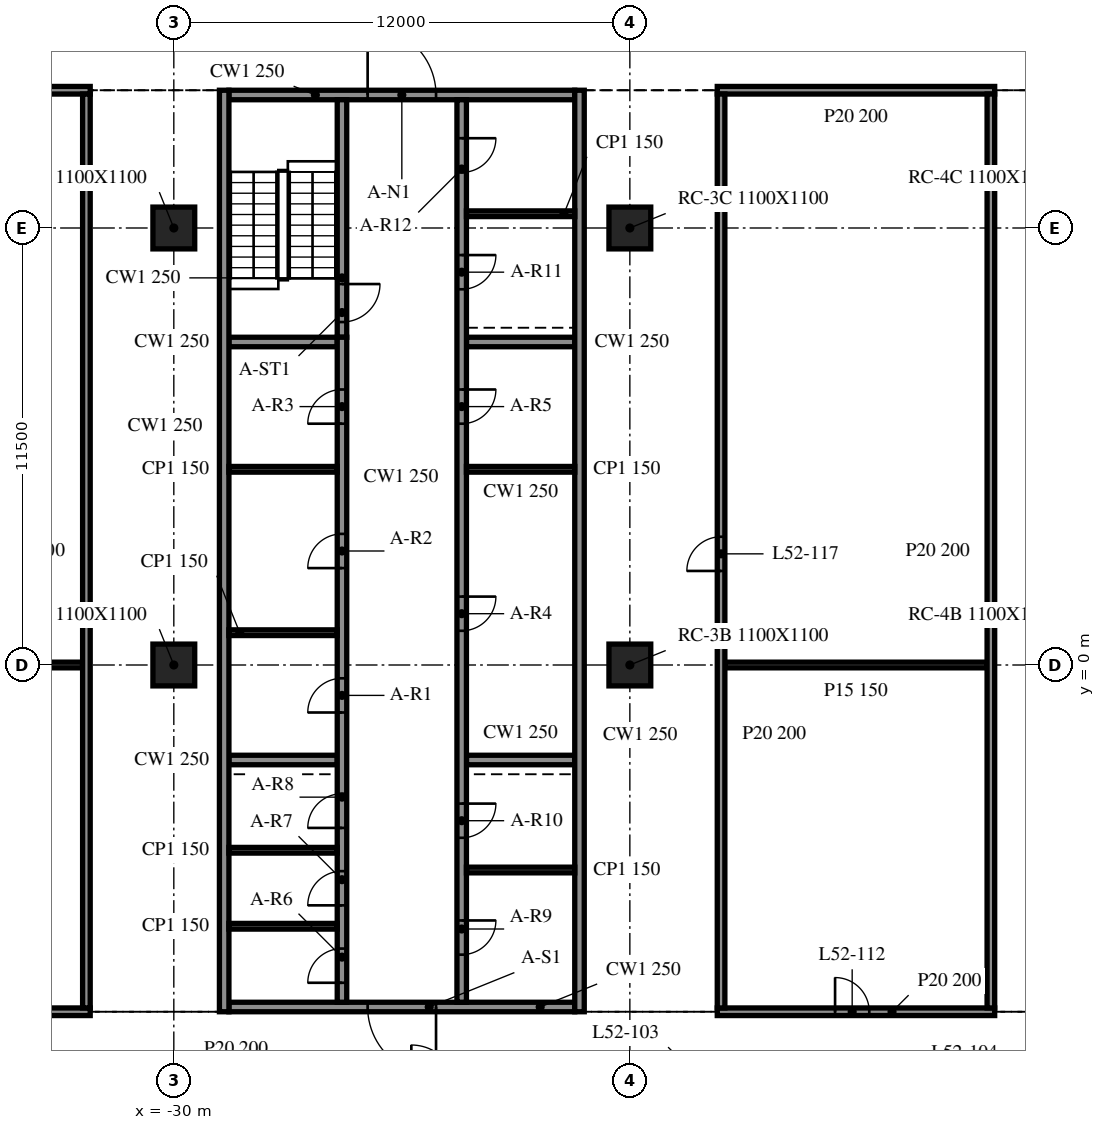
"""IFC4 building model, lengths in metres.
Left out: names, types, materials, properties, quantities, classifications, styles, units other than length and angle.
Written with IfcOpenShell. Run it as: python <this file> out.ifc"""

import sys

from ifc_helpers import new_model, si_unit, direction, frame, frame_2d, origin, origin_2d, place, context, subcontext, project, spatial, rectangle, extrude, element, fill, save


model = new_model("IFC4")
c1 = context("Model", 3, precision=1e-05, world=origin(), true_north=direction((0.0, 1.0)))
c2 = subcontext(c1, "Body", "Model", "MODEL_VIEW")
j1 = project(units=[si_unit("LENGTHUNIT", "METRE"), si_unit("PLANEANGLEUNIT", "RADIAN")], contexts=[c1])
p1 = place(None, origin())
s1 = spatial("IfcSite", under=j1, at=p1, CompositionType="ELEMENT")
p2 = place(p1, origin())
s2 = spatial("IfcBuilding", under=s1, at=p2, CompositionType="ELEMENT")
p3 = place(p2, frame((0.0, 0.0, 216.7)))
s3 = spatial("IfcBuildingStorey", under=s2, at=p3, CompositionType="ELEMENT", Elevation=216.7)
for number, where, z_axis, x_axis in (
    (1, (-30.0, 0.0, -0.34), (0.0, 0.0, 1.0), (1.0, 0.0, 0.0)),
    (2, (-30.0, 11.5, -0.34), (0.0, 0.0, 1.0), (1.0, 0.0, 0.0)),
    (3, (-18.0, 0.0, -0.34), (0.0, 0.0, 1.0), (1.0, 0.0, 0.0)),
    (4, (-18.0, 11.5, -0.34), (0.0, 0.0, 1.0), (1.0, 0.0, 0.0)),
):
    element("IfcColumn", number, at=place(p3, frame(where, z_axis=z_axis, x_axis=x_axis)), inside=s3, PredefinedType="COLUMN", context=c2, shape_type="SweptSolid", body=[
        extrude(rectangle(XDim=1.1, YDim=1.1, at=origin_2d()), origin(), (0.0, 0.0, 1.0), 3.8),
    ])
for number, where, z_axis, x_axis in (
    (5, (-28.675, 15.125, 0.0), (0.0, 0.0, 1.0), (0.0, -1.0, 0.0)),
    (6, (-19.325, -9.125, 0.0), (0.0, 0.0, 1.0), (0.0, 1.0, 0.0)),
):
    element("IfcWall", number, at=place(p3, frame(where, z_axis=z_axis, x_axis=x_axis)), inside=s3, PredefinedType="SOLIDWALL", context=c2, shape_type="SweptSolid", body=[
        extrude(rectangle(XDim=24.25, YDim=0.25, at=frame_2d((12.125, 0.0))), origin(), (0.0, 0.0, 1.0), 3.46),
    ])
p4 = place(p3, frame((-19.45, -9.0, 0.0), z_axis=(0.0, 0.0, 1.0), x_axis=(-1.0, 0.0, 0.0)))
e7 = element("IfcWall", 7, at=p4, inside=s3, PredefinedType="SOLIDWALL", context=c2, shape_type="SweptSolid", body=[
    extrude(rectangle(XDim=9.1, YDim=0.25, at=frame_2d((4.55, 0.0))), origin(), (0.0, 0.0, 1.0), 3.46),
])
p5 = place(p4, frame((3.65, 0.0, 0.0)))
e8 = element("IfcOpeningElement", 8, at=p5, cuts=e7, PredefinedType="OPENING", context=c2, shape_type="SweptSolid", body=[
    extrude(rectangle(XDim=1.8, YDim=2.1, at=frame_2d((0.9, 1.05))), frame((0.0, 0.135, 0.0), z_axis=(0.0, -1.0, 0.0), x_axis=(1.0, 0.0, 0.0)), (0.0, 0.0, 1.0), 0.27),
])
p6 = place(p3, frame((-28.55, 15.0, 0.0), z_axis=(0.0, 0.0, 1.0), x_axis=(1.0, 0.0, 0.0)))
e9 = element("IfcWall", 9, at=p6, inside=s3, PredefinedType="SOLIDWALL", context=c2, shape_type="SweptSolid", body=[
    extrude(rectangle(XDim=9.1, YDim=0.25, at=frame_2d((4.55, 0.0))), origin(), (0.0, 0.0, 1.0), 3.46),
])
p7 = place(p6, frame((3.65, 0.0, 0.0)))
e10 = element("IfcOpeningElement", 10, at=p7, cuts=e9, PredefinedType="OPENING", context=c2, shape_type="SweptSolid", body=[
    extrude(rectangle(XDim=1.8, YDim=2.1, at=frame_2d((0.9, 1.05))), frame((0.0, 0.135, 0.0), z_axis=(0.0, -1.0, 0.0), x_axis=(1.0, 0.0, 0.0)), (0.0, 0.0, 1.0), 0.27),
])
p8 = place(p3, frame((-25.575, -8.875, 0.0), z_axis=(0.0, 0.0, 1.0), x_axis=(0.0, 1.0, 0.0)))
e11 = element("IfcWall", 11, at=p8, inside=s3, PredefinedType="SOLIDWALL", context=c2, shape_type="SweptSolid", body=[
    extrude(rectangle(XDim=17.5, YDim=0.25, at=frame_2d((8.75, 0.0))), origin(), (0.0, 0.0, 1.0), 3.46),
])
p9 = place(p8, frame((7.625, 0.0, 0.0)))
e12 = element("IfcOpeningElement", 12, at=p9, cuts=e11, PredefinedType="OPENING", context=c2, shape_type="SweptSolid", body=[
    extrude(rectangle(XDim=0.9, YDim=2.1, at=frame_2d((0.45, 1.05))), frame((0.0, 0.135, 0.0), z_axis=(0.0, -1.0, 0.0), x_axis=(1.0, 0.0, 0.0)), (0.0, 0.0, 1.0), 0.27),
])
p10 = place(p8, frame((11.425, 0.0, 0.0)))
e13 = element("IfcOpeningElement", 13, at=p10, cuts=e11, PredefinedType="OPENING", context=c2, shape_type="SweptSolid", body=[
    extrude(rectangle(XDim=0.9, YDim=2.1, at=frame_2d((0.45, 1.05))), frame((0.0, 0.135, 0.0), z_axis=(0.0, -1.0, 0.0), x_axis=(1.0, 0.0, 0.0)), (0.0, 0.0, 1.0), 0.27),
])
p11 = place(p8, frame((15.225, 0.0, 0.0)))
e14 = element("IfcOpeningElement", 14, at=p11, cuts=e11, PredefinedType="OPENING", context=c2, shape_type="SweptSolid", body=[
    extrude(rectangle(XDim=0.9, YDim=2.1, at=frame_2d((0.45, 1.05))), frame((0.0, 0.135, 0.0), z_axis=(0.0, -1.0, 0.0), x_axis=(1.0, 0.0, 0.0)), (0.0, 0.0, 1.0), 0.27),
])
p12 = place(p8, frame((0.512, 0.0, 0.0)))
e15 = element("IfcOpeningElement", 15, at=p12, cuts=e11, PredefinedType="OPENING", context=c2, shape_type="SweptSolid", body=[
    extrude(rectangle(XDim=0.9, YDim=2.1, at=frame_2d((0.45, 1.05))), frame((0.0, 0.135, 0.0), z_axis=(0.0, -1.0, 0.0), x_axis=(1.0, 0.0, 0.0)), (0.0, 0.0, 1.0), 0.27),
])
p13 = place(p8, frame((2.55, 0.0, 0.0)))
e16 = element("IfcOpeningElement", 16, at=p13, cuts=e11, PredefinedType="OPENING", context=c2, shape_type="SweptSolid", body=[
    extrude(rectangle(XDim=0.9, YDim=2.1, at=frame_2d((0.45, 1.05))), frame((0.0, 0.135, 0.0), z_axis=(0.0, -1.0, 0.0), x_axis=(1.0, 0.0, 0.0)), (0.0, 0.0, 1.0), 0.27),
])
p14 = place(p8, frame((4.587, 0.0, 0.0)))
e17 = element("IfcOpeningElement", 17, at=p14, cuts=e11, PredefinedType="OPENING", context=c2, shape_type="SweptSolid", body=[
    extrude(rectangle(XDim=0.9, YDim=2.1, at=frame_2d((0.45, 1.05))), frame((0.0, 0.135, 0.0), z_axis=(0.0, -1.0, 0.0), x_axis=(1.0, 0.0, 0.0)), (0.0, 0.0, 1.0), 0.27),
])
p15 = place(p3, frame((-25.575, 14.875, 0.0), z_axis=(0.0, 0.0, 1.0), x_axis=(0.0, -1.0, 0.0)))
e18 = element("IfcWall", 18, at=p15, inside=s3, PredefinedType="SOLIDWALL", context=c2, shape_type="SweptSolid", body=[
    extrude(rectangle(XDim=6.25, YDim=0.25, at=frame_2d((3.125, 0.0))), origin(), (0.0, 0.0, 1.0), 3.46),
])
p16 = place(p15, frame((4.85, 0.0, 0.0)))
e19 = element("IfcOpeningElement", 19, at=p16, cuts=e18, PredefinedType="OPENING", context=c2, shape_type="SweptSolid", body=[
    extrude(rectangle(XDim=1.0, YDim=2.1, at=frame_2d((0.5, 1.05))), frame((0.0, 0.135, 0.0), z_axis=(0.0, -1.0, 0.0), x_axis=(1.0, 0.0, 0.0)), (0.0, 0.0, 1.0), 0.27),
])
p17 = place(p3, frame((-22.425, 14.875, 0.0), z_axis=(0.0, 0.0, 1.0), x_axis=(0.0, -1.0, 0.0)))
e20 = element("IfcWall", 20, at=p17, inside=s3, PredefinedType="SOLIDWALL", context=c2, shape_type="SweptSolid", body=[
    extrude(rectangle(XDim=23.75, YDim=0.25, at=frame_2d((11.875, 0.0))), origin(), (0.0, 0.0, 1.0), 3.46),
])
p18 = place(p17, frame((13.075, 0.0, 0.0)))
e21 = element("IfcOpeningElement", 21, at=p18, cuts=e20, PredefinedType="OPENING", context=c2, shape_type="SweptSolid", body=[
    extrude(rectangle(XDim=0.9, YDim=2.1, at=frame_2d((0.45, 1.05))), frame((0.0, 0.135, 0.0), z_axis=(0.0, -1.0, 0.0), x_axis=(1.0, 0.0, 0.0)), (0.0, 0.0, 1.0), 0.27),
])
p19 = place(p17, frame((7.625, 0.0, 0.0)))
e22 = element("IfcOpeningElement", 22, at=p19, cuts=e20, PredefinedType="OPENING", context=c2, shape_type="SweptSolid", body=[
    extrude(rectangle(XDim=0.9, YDim=2.1, at=frame_2d((0.45, 1.05))), frame((0.0, 0.135, 0.0), z_axis=(0.0, -1.0, 0.0), x_axis=(1.0, 0.0, 0.0)), (0.0, 0.0, 1.0), 0.27),
])
p20 = place(p17, frame((21.597, 0.0, 0.0)))
e23 = element("IfcOpeningElement", 23, at=p20, cuts=e20, PredefinedType="OPENING", context=c2, shape_type="SweptSolid", body=[
    extrude(rectangle(XDim=0.9, YDim=2.1, at=frame_2d((0.45, 1.05))), frame((0.0, 0.135, 0.0), z_axis=(0.0, -1.0, 0.0), x_axis=(1.0, 0.0, 0.0)), (0.0, 0.0, 1.0), 0.27),
])
p21 = place(p17, frame((18.522, 0.0, 0.0)))
e24 = element("IfcOpeningElement", 24, at=p21, cuts=e20, PredefinedType="OPENING", context=c2, shape_type="SweptSolid", body=[
    extrude(rectangle(XDim=0.9, YDim=2.1, at=frame_2d((0.45, 1.05))), frame((0.0, 0.135, 0.0), z_axis=(0.0, -1.0, 0.0), x_axis=(1.0, 0.0, 0.0)), (0.0, 0.0, 1.0), 0.27),
])
p22 = place(p17, frame((4.087, 0.0, 0.0)))
e25 = element("IfcOpeningElement", 25, at=p22, cuts=e20, PredefinedType="OPENING", context=c2, shape_type="SweptSolid", body=[
    extrude(rectangle(XDim=0.9, YDim=2.1, at=frame_2d((0.45, 1.05))), frame((0.0, 0.135, 0.0), z_axis=(0.0, -1.0, 0.0), x_axis=(1.0, 0.0, 0.0)), (0.0, 0.0, 1.0), 0.27),
])
p23 = place(p17, frame((1.012, 0.0, 0.0)))
e26 = element("IfcOpeningElement", 26, at=p23, cuts=e20, PredefinedType="OPENING", context=c2, shape_type="SweptSolid", body=[
    extrude(rectangle(XDim=0.9, YDim=2.1, at=frame_2d((0.45, 1.05))), frame((0.0, 0.135, 0.0), z_axis=(0.0, -1.0, 0.0), x_axis=(1.0, 0.0, 0.0)), (0.0, 0.0, 1.0), 0.27),
])
for number, where, z_axis, x_axis in (
    (27, (-28.55, -2.5, 0.0), (0.0, 0.0, 1.0), (1.0, 0.0, 0.0)),
    (28, (-28.55, 8.5, 0.0), (0.0, 0.0, 1.0), (1.0, 0.0, 0.0)),
    (29, (-22.3, -2.5, 0.0), (0.0, 0.0, 1.0), (1.0, 0.0, 0.0)),
    (30, (-22.3, 8.5, 0.0), (0.0, 0.0, 1.0), (1.0, 0.0, 0.0)),
):
    element("IfcWall", number, at=place(p3, frame(where, z_axis=z_axis, x_axis=x_axis)), inside=s3, PredefinedType="SOLIDWALL", context=c2, shape_type="SweptSolid", body=[
        extrude(rectangle(XDim=2.85, YDim=0.25, at=frame_2d((1.425, 0.0))), origin(), (0.0, 0.0, 1.0), 3.46),
    ])
for number, where, z_axis, x_axis in (
    (31, (-28.55, 0.85, 0.0), (0.0, 0.0, 1.0), (1.0, 0.0, 0.0)),
    (32, (-28.55, 5.15, 0.0), (0.0, 0.0, 1.0), (1.0, 0.0, 0.0)),
    (33, (-22.3, 5.15, 0.0), (0.0, 0.0, 1.0), (1.0, 0.0, 0.0)),
    (34, (-28.55, -6.875, 0.0), (0.0, 0.0, 1.0), (1.0, 0.0, 0.0)),
    (35, (-28.55, -4.875, 0.0), (0.0, 0.0, 1.0), (1.0, 0.0, 0.0)),
    (36, (-22.3, -5.395, 0.0), (0.0, 0.0, 1.0), (1.0, 0.0, 0.0)),
    (37, (-22.3, 11.875, 0.0), (0.0, 0.0, 1.0), (1.0, 0.0, 0.0)),
):
    element("IfcWall", number, at=place(p3, frame(where, z_axis=z_axis, x_axis=x_axis)), inside=s3, PredefinedType="PARTITIONING", context=c2, shape_type="SweptSolid", body=[
        extrude(rectangle(XDim=2.85, YDim=0.15, at=frame_2d((1.425, 0.0))), origin(), (0.0, 0.0, 1.0), 3.46),
    ])
p24 = place(p3, frame((-41.975, -9.125, 0.0), z_axis=(0.0, 0.0, 1.0), x_axis=(1.0, 0.0, 0.0)))
e38 = element("IfcWall", 38, at=p24, inside=s3, PredefinedType="PARTITIONING", context=c2, shape_type="SweptSolid", body=[
    extrude(rectangle(XDim=9.775, YDim=0.2, at=frame_2d((4.888, 0.0))), origin(), (0.0, 0.0, 1.0), 3.46),
])
p25 = place(p24, frame((4.3, 0.0, 0.0)))
e39 = element("IfcOpeningElement", 39, at=p25, cuts=e38, PredefinedType="OPENING", context=c2, shape_type="SweptSolid", body=[
    extrude(rectangle(XDim=1.2, YDim=2.1, at=frame_2d((0.6, 1.05))), frame((0.0, 0.11, 0.0), z_axis=(0.0, -1.0, 0.0), x_axis=(1.0, 0.0, 0.0)), (0.0, 0.0, 1.0), 0.22),
])
p26 = place(p3, frame((-15.7, -9.125, 0.0), z_axis=(0.0, 0.0, 1.0), x_axis=(1.0, 0.0, 0.0)))
e40 = element("IfcWall", 40, at=p26, inside=s3, PredefinedType="PARTITIONING", context=c2, shape_type="SweptSolid", body=[
    extrude(rectangle(XDim=7.3, YDim=0.2, at=frame_2d((3.65, 0.0))), origin(), (0.0, 0.0, 1.0), 3.46),
])
p27 = place(p26, frame((3.1, 0.0, 0.0)))
e41 = element("IfcOpeningElement", 41, at=p27, cuts=e40, PredefinedType="OPENING", context=c2, shape_type="SweptSolid", body=[
    extrude(rectangle(XDim=0.9, YDim=2.1, at=frame_2d((0.45, 1.05))), frame((0.0, 0.11, 0.0), z_axis=(0.0, -1.0, 0.0), x_axis=(1.0, 0.0, 0.0)), (0.0, 0.0, 1.0), 0.22),
])
p28 = place(p3, frame((-41.45, 0.0, 0.0), z_axis=(0.0, 0.0, 1.0), x_axis=(1.0, 0.0, 0.0)))
e42 = element("IfcWall", 42, at=p28, inside=s3, PredefinedType="PARTITIONING", context=c2, shape_type="SweptSolid", body=[
    extrude(rectangle(XDim=9.05, YDim=0.15, at=frame_2d((4.525, 0.0))), origin(), (0.0, 0.0, 1.0), 3.46),
])
p29 = place(p3, frame((-15.5, 0.0, 0.0), z_axis=(0.0, 0.0, 1.0), x_axis=(1.0, 0.0, 0.0)))
e43 = element("IfcWall", 43, at=p29, inside=s3, PredefinedType="PARTITIONING", context=c2, shape_type="SweptSolid", body=[
    extrude(rectangle(XDim=6.9, YDim=0.15, at=frame_2d((3.45, 0.0))), origin(), (0.0, 0.0, 1.0), 3.46),
])
p30 = place(p3, frame((-41.975, 15.125, 0.0), z_axis=(0.0, 0.0, 1.0), x_axis=(1.0, 0.0, 0.0)))
e44 = element("IfcWall", 44, at=p30, inside=s3, PredefinedType="PARTITIONING", context=c2, shape_type="SweptSolid", body=[
    extrude(rectangle(XDim=9.775, YDim=0.2, at=frame_2d((4.888, 0.0))), origin(), (0.0, 0.0, 1.0), 3.46),
])
p31 = place(p30, frame((4.3, 0.0, 0.0)))
e45 = element("IfcOpeningElement", 45, at=p31, cuts=e44, PredefinedType="OPENING", context=c2, shape_type="SweptSolid", body=[
    extrude(rectangle(XDim=1.0, YDim=2.1, at=frame_2d((0.5, 1.05))), frame((0.0, 0.11, 0.0), z_axis=(0.0, -1.0, 0.0), x_axis=(1.0, 0.0, 0.0)), (0.0, 0.0, 1.0), 0.22),
])
p32 = place(p3, frame((-15.7, 15.125, 0.0), z_axis=(0.0, 0.0, 1.0), x_axis=(1.0, 0.0, 0.0)))
e46 = element("IfcWall", 46, at=p32, inside=s3, PredefinedType="PARTITIONING", context=c2, shape_type="SweptSolid", body=[
    extrude(rectangle(XDim=7.3, YDim=0.2, at=frame_2d((3.65, 0.0))), origin(), (0.0, 0.0, 1.0), 3.46),
])
p33 = place(p3, frame((-32.3, -9.025, 0.0), z_axis=(0.0, 0.0, 1.0), x_axis=(0.0, 1.0, 0.0)))
e47 = element("IfcWall", 47, at=p33, inside=s3, PredefinedType="PARTITIONING", context=c2, shape_type="SweptSolid", body=[
    extrude(rectangle(XDim=24.05, YDim=0.2, at=frame_2d((12.025, 0.0))), origin(), (0.0, 0.0, 1.0), 3.46),
])
p34 = place(p3, frame((-15.6, -9.025, 0.0), z_axis=(0.0, 0.0, 1.0), x_axis=(0.0, 1.0, 0.0)))
e48 = element("IfcWall", 48, at=p34, inside=s3, PredefinedType="PARTITIONING", context=c2, shape_type="SweptSolid", body=[
    extrude(rectangle(XDim=24.05, YDim=0.2, at=frame_2d((12.025, 0.0))), origin(), (0.0, 0.0, 1.0), 3.46),
])
p35 = place(p34, frame((11.5, 0.0, 0.0)))
e49 = element("IfcOpeningElement", 49, at=p35, cuts=e48, PredefinedType="OPENING", context=c2, shape_type="SweptSolid", body=[
    extrude(rectangle(XDim=0.9, YDim=2.1, at=frame_2d((0.45, 1.05))), frame((0.0, 0.11, 0.0), z_axis=(0.0, -1.0, 0.0), x_axis=(1.0, 0.0, 0.0)), (0.0, 0.0, 1.0), 0.22),
])
p36 = place(p3, frame((-8.5, -9.025, 0.0), z_axis=(0.0, 0.0, 1.0), x_axis=(0.0, 1.0, 0.0)))
e50 = element("IfcWall", 50, at=p36, inside=s3, PredefinedType="PARTITIONING", context=c2, shape_type="SweptSolid", body=[
    extrude(rectangle(XDim=24.05, YDim=0.2, at=frame_2d((12.025, 0.0))), origin(), (0.0, 0.0, 1.0), 3.46),
])
p37 = place(p5, origin())
e51 = element("IfcDoor", 51, at=p37, inside=s3, OperationType="DOUBLE_DOOR_SINGLE_SWING", PredefinedType="DOOR", context=c2, shape_type="SweptSolid", body=[
    extrude(rectangle(XDim=1.8, YDim=2.1, at=frame_2d((0.9, 1.05))), frame((0.0, 0.025, 0.0), z_axis=(0.0, -1.0, 0.0), x_axis=(1.0, 0.0, 0.0)), (0.0, 0.0, 1.0), 0.05),
])
fill(e8, e51)
p38 = place(p7, origin())
e52 = element("IfcDoor", 52, at=p38, inside=s3, OperationType="DOUBLE_DOOR_SINGLE_SWING", PredefinedType="DOOR", context=c2, shape_type="SweptSolid", body=[
    extrude(rectangle(XDim=1.8, YDim=2.1, at=frame_2d((0.9, 1.05))), frame((0.0, 0.025, 0.0), z_axis=(0.0, -1.0, 0.0), x_axis=(1.0, 0.0, 0.0)), (0.0, 0.0, 1.0), 0.05),
])
fill(e10, e52)
p39 = place(p9, origin())
e53 = element("IfcDoor", 53, at=p39, inside=s3, OperationType="SINGLE_SWING_LEFT", PredefinedType="DOOR", context=c2, shape_type="SweptSolid", body=[
    extrude(rectangle(XDim=0.9, YDim=2.1, at=frame_2d((0.45, 1.05))), frame((0.0, 0.025, 0.0), z_axis=(0.0, -1.0, 0.0), x_axis=(1.0, 0.0, 0.0)), (0.0, 0.0, 1.0), 0.05),
])
fill(e12, e53)
p40 = place(p10, origin())
e54 = element("IfcDoor", 54, at=p40, inside=s3, OperationType="SINGLE_SWING_RIGHT", PredefinedType="DOOR", context=c2, shape_type="SweptSolid", body=[
    extrude(rectangle(XDim=0.9, YDim=2.1, at=frame_2d((0.45, 1.05))), frame((0.0, 0.025, 0.0), z_axis=(0.0, -1.0, 0.0), x_axis=(1.0, 0.0, 0.0)), (0.0, 0.0, 1.0), 0.05),
])
fill(e13, e54)
p41 = place(p11, origin())
e55 = element("IfcDoor", 55, at=p41, inside=s3, OperationType="SINGLE_SWING_LEFT", PredefinedType="DOOR", context=c2, shape_type="SweptSolid", body=[
    extrude(rectangle(XDim=0.9, YDim=2.1, at=frame_2d((0.45, 1.05))), frame((0.0, 0.025, 0.0), z_axis=(0.0, -1.0, 0.0), x_axis=(1.0, 0.0, 0.0)), (0.0, 0.0, 1.0), 0.05),
])
fill(e14, e55)
p42 = place(p18, origin())
e56 = element("IfcDoor", 56, at=p42, inside=s3, OperationType="SINGLE_SWING_RIGHT", PredefinedType="DOOR", context=c2, shape_type="SweptSolid", body=[
    extrude(rectangle(XDim=0.9, YDim=2.1, at=frame_2d((0.45, 1.05))), frame((0.0, 0.025, 0.0), z_axis=(0.0, -1.0, 0.0), x_axis=(1.0, 0.0, 0.0)), (0.0, 0.0, 1.0), 0.05),
])
fill(e21, e56)
p43 = place(p19, origin())
e57 = element("IfcDoor", 57, at=p43, inside=s3, OperationType="SINGLE_SWING_LEFT", PredefinedType="DOOR", context=c2, shape_type="SweptSolid", body=[
    extrude(rectangle(XDim=0.9, YDim=2.1, at=frame_2d((0.45, 1.05))), frame((0.0, 0.025, 0.0), z_axis=(0.0, -1.0, 0.0), x_axis=(1.0, 0.0, 0.0)), (0.0, 0.0, 1.0), 0.05),
])
fill(e22, e57)
p44 = place(p12, origin())
e58 = element("IfcDoor", 58, at=p44, inside=s3, OperationType="SINGLE_SWING_RIGHT", PredefinedType="DOOR", context=c2, shape_type="SweptSolid", body=[
    extrude(rectangle(XDim=0.9, YDim=2.1, at=frame_2d((0.45, 1.05))), frame((0.0, 0.025, 0.0), z_axis=(0.0, -1.0, 0.0), x_axis=(1.0, 0.0, 0.0)), (0.0, 0.0, 1.0), 0.05),
])
fill(e15, e58)
p45 = place(p13, origin())
e59 = element("IfcDoor", 59, at=p45, inside=s3, OperationType="SINGLE_SWING_LEFT", PredefinedType="DOOR", context=c2, shape_type="SweptSolid", body=[
    extrude(rectangle(XDim=0.9, YDim=2.1, at=frame_2d((0.45, 1.05))), frame((0.0, 0.025, 0.0), z_axis=(0.0, -1.0, 0.0), x_axis=(1.0, 0.0, 0.0)), (0.0, 0.0, 1.0), 0.05),
])
fill(e16, e59)
p46 = place(p14, origin())
e60 = element("IfcDoor", 60, at=p46, inside=s3, OperationType="SINGLE_SWING_RIGHT", PredefinedType="DOOR", context=c2, shape_type="SweptSolid", body=[
    extrude(rectangle(XDim=0.9, YDim=2.1, at=frame_2d((0.45, 1.05))), frame((0.0, 0.025, 0.0), z_axis=(0.0, -1.0, 0.0), x_axis=(1.0, 0.0, 0.0)), (0.0, 0.0, 1.0), 0.05),
])
fill(e17, e60)
p47 = place(p20, origin())
e61 = element("IfcDoor", 61, at=p47, inside=s3, OperationType="SINGLE_SWING_LEFT", PredefinedType="DOOR", context=c2, shape_type="SweptSolid", body=[
    extrude(rectangle(XDim=0.9, YDim=2.1, at=frame_2d((0.45, 1.05))), frame((0.0, 0.025, 0.0), z_axis=(0.0, -1.0, 0.0), x_axis=(1.0, 0.0, 0.0)), (0.0, 0.0, 1.0), 0.05),
])
fill(e23, e61)
p48 = place(p21, origin())
e62 = element("IfcDoor", 62, at=p48, inside=s3, OperationType="SINGLE_SWING_RIGHT", PredefinedType="DOOR", context=c2, shape_type="SweptSolid", body=[
    extrude(rectangle(XDim=0.9, YDim=2.1, at=frame_2d((0.45, 1.05))), frame((0.0, 0.025, 0.0), z_axis=(0.0, -1.0, 0.0), x_axis=(1.0, 0.0, 0.0)), (0.0, 0.0, 1.0), 0.05),
])
fill(e24, e62)
p49 = place(p22, origin())
e63 = element("IfcDoor", 63, at=p49, inside=s3, OperationType="SINGLE_SWING_LEFT", PredefinedType="DOOR", context=c2, shape_type="SweptSolid", body=[
    extrude(rectangle(XDim=0.9, YDim=2.1, at=frame_2d((0.45, 1.05))), frame((0.0, 0.025, 0.0), z_axis=(0.0, -1.0, 0.0), x_axis=(1.0, 0.0, 0.0)), (0.0, 0.0, 1.0), 0.05),
])
fill(e25, e63)
p50 = place(p23, origin())
e64 = element("IfcDoor", 64, at=p50, inside=s3, OperationType="SINGLE_SWING_RIGHT", PredefinedType="DOOR", context=c2, shape_type="SweptSolid", body=[
    extrude(rectangle(XDim=0.9, YDim=2.1, at=frame_2d((0.45, 1.05))), frame((0.0, 0.025, 0.0), z_axis=(0.0, -1.0, 0.0), x_axis=(1.0, 0.0, 0.0)), (0.0, 0.0, 1.0), 0.05),
])
fill(e26, e64)
p51 = place(p16, origin())
e65 = element("IfcDoor", 65, at=p51, inside=s3, OperationType="SINGLE_SWING_LEFT", PredefinedType="DOOR", context=c2, shape_type="SweptSolid", body=[
    extrude(rectangle(XDim=1.0, YDim=2.1, at=frame_2d((0.5, 1.05))), frame((0.0, 0.025, 0.0), z_axis=(0.0, -1.0, 0.0), x_axis=(1.0, 0.0, 0.0)), (0.0, 0.0, 1.0), 0.05),
])
fill(e19, e65)
p52 = place(p27, origin())
e66 = element("IfcDoor", 66, at=p52, inside=s3, OperationType="SINGLE_SWING_LEFT", PredefinedType="DOOR", context=c2, shape_type="SweptSolid", body=[
    extrude(rectangle(XDim=0.9, YDim=2.1, at=frame_2d((0.45, 1.05))), frame((0.0, 0.025, 0.0), z_axis=(0.0, -1.0, 0.0), x_axis=(1.0, 0.0, 0.0)), (0.0, 0.0, 1.0), 0.05),
])
fill(e41, e66)
p53 = place(p35, origin())
e67 = element("IfcDoor", 67, at=p53, inside=s3, OperationType="SINGLE_SWING_RIGHT", PredefinedType="DOOR", context=c2, shape_type="SweptSolid", body=[
    extrude(rectangle(XDim=0.9, YDim=2.1, at=frame_2d((0.45, 1.05))), frame((0.0, 0.025, 0.0), z_axis=(0.0, -1.0, 0.0), x_axis=(1.0, 0.0, 0.0)), (0.0, 0.0, 1.0), 0.05),
])
fill(e49, e67)
save(model, sys.argv[1])
